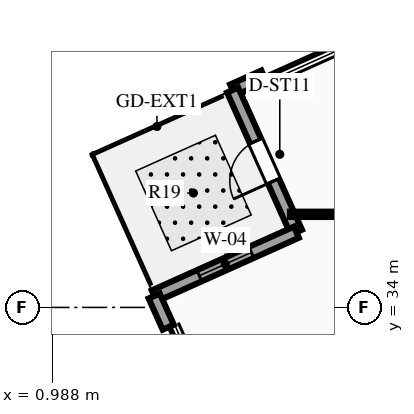
"""IFC4 building model, lengths in metres.
Left out: names, types, materials, properties, quantities, classifications, styles, units other than length and angle.
Written with IfcOpenShell. Run it as: python <this file> out.ifc"""

import sys

from ifc_helpers import new_model, si_unit, direction, frame, frame_2d, origin, place, context, subcontext, project, spatial, rectangle, extrude, element, fill, save


model = new_model("IFC4")
c1 = context("Model", 3, precision=1e-05, world=origin(), true_north=direction((0.0, 1.0)))
c2 = subcontext(c1, "Body", "Model", "MODEL_VIEW")
j1 = project(units=[si_unit("LENGTHUNIT", "METRE"), si_unit("PLANEANGLEUNIT", "RADIAN")], contexts=[c1])
p1 = place(None, origin())
s1 = spatial("IfcSite", under=j1, at=p1, CompositionType="ELEMENT")
p2 = place(p1, origin())
s2 = spatial("IfcBuilding", under=s1, at=p2, CompositionType="ELEMENT")
p3 = place(p2, frame((0.0, 0.0, 109.2)))
s3 = spatial("IfcBuildingStorey", under=s2, at=p3, CompositionType="ELEMENT", Elevation=109.2)
p4 = place(p3, frame((5.738, 39.72, 0.0), z_axis=(0.0, 0.0, 1.0), x_axis=(0.912463919071, 0.409157178103, 0.0)))
e1 = element("IfcWall", 1, at=p4, inside=s3, PredefinedType="STANDARD", context=c2, shape_type="SweptSolid", body=[
    extrude(rectangle(XDim=0.9, YDim=0.32, at=frame_2d((0.45, 0.0))), origin(), (0.0, 0.0, 1.0), 3.45),
])
p5 = place(p3, frame((7.416, 35.979, 0.0), z_axis=(0.0, 0.0, 1.0), x_axis=(-0.409136259283, 0.912473298974, 0.0)))
e2 = element("IfcWall", 2, at=p5, inside=s3, PredefinedType="STANDARD", context=c2, shape_type="SweptSolid", body=[
    extrude(rectangle(XDim=4.1, YDim=0.32, at=frame_2d((2.05, 0.0))), origin(), (0.0, 0.0, 1.0), 3.45),
])
p6 = place(p5, frame((1.475, 0.0, 0.0)))
e3 = element("IfcOpeningElement", 3, at=p6, cuts=e2, PredefinedType="OPENING", context=c2, shape_type="SweptSolid", body=[
    extrude(rectangle(XDim=1.15, YDim=2.2, at=frame_2d((0.575, 1.1))), frame((0.0, 0.17, 0.0), z_axis=(0.0, -1.0, 0.0), x_axis=(1.0, 0.0, 0.0)), (0.0, 0.0, 1.0), 0.34),
])
p7 = place(p3, frame((3.675, 34.301, 0.0), z_axis=(0.0, 0.0, 1.0), x_axis=(0.912473298974, 0.409136259283, 0.0)))
e4 = element("IfcWall", 4, at=p7, inside=s3, PredefinedType="STANDARD", context=c2, shape_type="SweptSolid", body=[
    extrude(rectangle(XDim=4.1, YDim=0.32, at=frame_2d((2.05, 0.0))), origin(), (0.0, 0.0, 1.0), 3.45),
])
p8 = place(p7, frame((1.3, 0.0, 0.85)))
e5 = element("IfcOpeningElement", 5, at=p8, cuts=e4, PredefinedType="OPENING", context=c2, shape_type="SweptSolid", body=[
    extrude(rectangle(XDim=1.5, YDim=2.1, at=frame_2d((0.75, 1.05))), frame((0.0, 0.17, 0.0), z_axis=(0.0, -1.0, 0.0), x_axis=(1.0, 0.0, 0.0)), (0.0, 0.0, 1.0), 0.34),
])
p9 = place(p3, frame((4.043, 33.48, 0.0), z_axis=(0.0, 0.0, 1.0), x_axis=(-0.409055904093, 0.912509324515, 0.0)))
e6 = element("IfcWall", 6, at=p9, inside=s3, PredefinedType="STANDARD", context=c2, shape_type="SweptSolid", body=[
    extrude(rectangle(XDim=0.9, YDim=0.32, at=frame_2d((0.45, 0.0))), origin(), (0.0, 0.0, 1.0), 3.45),
])
p10 = place(p3, frame((7.248, 36.45, 0.0), z_axis=(0.0, 0.0, 1.0), x_axis=(1.0, 0.0, 0.0)))
e7 = element("IfcWall", 7, at=p10, inside=s3, PredefinedType="PARTITIONING", context=c2, shape_type="SweptSolid", body=[
    extrude(rectangle(XDim=17.302, YDim=0.14, at=frame_2d((8.651, 0.0))), origin(), (0.0, 0.0, 1.0), 3.45),
])
p11 = place(p6, origin())
e8 = element("IfcDoor", 8, at=p11, inside=s3, OperationType="SINGLE_SWING_LEFT", PredefinedType="DOOR", context=c2, shape_type="SweptSolid", body=[
    extrude(rectangle(XDim=1.15, YDim=2.2, at=frame_2d((0.575, 1.1))), frame((0.0, 0.025, 0.0), z_axis=(0.0, -1.0, 0.0), x_axis=(1.0, 0.0, 0.0)), (0.0, 0.0, 1.0), 0.05),
])
fill(e3, e8)
p12 = place(p8, origin())
e9 = element("IfcWindow", 9, at=p12, inside=s3, PartitioningType="SINGLE_PANEL", PredefinedType="WINDOW", context=c2, shape_type="SweptSolid", body=[
    extrude(rectangle(XDim=1.5, YDim=2.1, at=frame_2d((0.75, 1.05))), frame((0.0, 0.03, 0.0), z_axis=(0.0, -1.0, 0.0), x_axis=(1.0, 0.0, 0.0)), (0.0, 0.0, 1.0), 0.06),
])
fill(e5, e9)
save(model, sys.argv[1])
